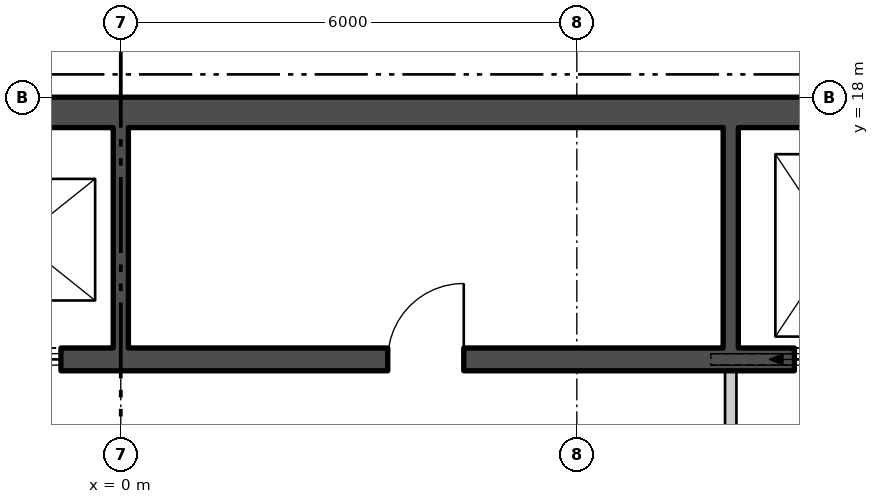
"""IFC4 building model, lengths in metres.
Left out: names, types, materials, properties, quantities, classifications, styles, units other than length and angle.
Written with IfcOpenShell. Run it as: python <this file> out.ifc"""

import sys

from ifc_helpers import new_model, si_unit, direction, frame, frame_2d, origin, place, context, subcontext, project, spatial, polyline, rectangle, outline, extrude, element, fill, save


model = new_model("IFC4")
c1 = context("Model", 3, precision=1e-05, world=origin(), true_north=direction((0.0, 1.0)))
c2 = subcontext(c1, "Body", "Model", "MODEL_VIEW")
j1 = project(units=[si_unit("LENGTHUNIT", "METRE"), si_unit("PLANEANGLEUNIT", "RADIAN")], contexts=[c1])
p1 = place(None, origin())
s1 = spatial("IfcSite", under=j1, at=p1, CompositionType="ELEMENT")
p2 = place(p1, origin())
s2 = spatial("IfcBuilding", under=s1, at=p2, CompositionType="ELEMENT")
p3 = place(p2, frame((0.0, 0.0, 312.6)))
s3 = spatial("IfcBuildingStorey", under=s2, at=p3, CompositionType="ELEMENT", Elevation=312.6)
p4 = place(p3, frame((2.12, -23.301, -0.18), z_axis=(0.0, 0.0, 1.0), x_axis=(0.500000141277, 0.866025322218, 0.0)))
e1 = element("IfcWall", 1, at=p4, inside=s3, PredefinedType="SOLIDWALL", context=c2, shape_type="SweptSolid", body=[
    extrude(outline(polyline([(-0.13, -0.225), (45.86, -0.225), (45.6, 0.225), (0.13, 0.225), (-0.13, -0.225)])), origin(), (0.0, 0.0, 1.0), 3.98),
])
p5 = place(p4, frame((1.424, 0.0, 1.08)))
e2 = element("IfcOpeningElement", 2, at=p5, cuts=e1, PredefinedType="OPENING", context=c2, shape_type="SweptSolid", body=[
    extrude(rectangle(XDim=2.4, YDim=2.3, at=frame_2d((1.2, 1.15))), frame((0.0, 0.235, 0.0), z_axis=(0.0, -1.0, 0.0), x_axis=(1.0, 0.0, 0.0)), (0.0, 0.0, 1.0), 0.47),
])
p6 = place(p4, frame((5.892, 0.0, 1.08)))
e3 = element("IfcOpeningElement", 3, at=p6, cuts=e1, PredefinedType="OPENING", context=c2, shape_type="SweptSolid", body=[
    extrude(rectangle(XDim=2.4, YDim=2.3, at=frame_2d((1.2, 1.15))), frame((0.0, 0.235, 0.0), z_axis=(0.0, -1.0, 0.0), x_axis=(1.0, 0.0, 0.0)), (0.0, 0.0, 1.0), 0.47),
])
p7 = place(p4, frame((14.905, 0.0, 1.08)))
e4 = element("IfcOpeningElement", 4, at=p7, cuts=e1, PredefinedType="OPENING", context=c2, shape_type="SweptSolid", body=[
    extrude(rectangle(XDim=2.4, YDim=2.3, at=frame_2d((1.2, 1.15))), frame((0.0, 0.235, 0.0), z_axis=(0.0, -1.0, 0.0), x_axis=(1.0, 0.0, 0.0)), (0.0, 0.0, 1.0), 0.47),
])
p8 = place(p4, frame((19.412, 0.0, 1.08)))
e5 = element("IfcOpeningElement", 5, at=p8, cuts=e1, PredefinedType="OPENING", context=c2, shape_type="SweptSolid", body=[
    extrude(rectangle(XDim=2.4, YDim=2.3, at=frame_2d((1.2, 1.15))), frame((0.0, 0.235, 0.0), z_axis=(0.0, -1.0, 0.0), x_axis=(1.0, 0.0, 0.0)), (0.0, 0.0, 1.0), 0.47),
])
p9 = place(p4, frame((23.918, 0.0, 1.08)))
e6 = element("IfcOpeningElement", 6, at=p9, cuts=e1, PredefinedType="OPENING", context=c2, shape_type="SweptSolid", body=[
    extrude(rectangle(XDim=2.4, YDim=2.3, at=frame_2d((1.2, 1.15))), frame((0.0, 0.235, 0.0), z_axis=(0.0, -1.0, 0.0), x_axis=(1.0, 0.0, 0.0)), (0.0, 0.0, 1.0), 0.47),
])
p10 = place(p4, frame((28.425, 0.0, 1.08)))
e7 = element("IfcOpeningElement", 7, at=p10, cuts=e1, PredefinedType="OPENING", context=c2, shape_type="SweptSolid", body=[
    extrude(rectangle(XDim=2.4, YDim=2.3, at=frame_2d((1.2, 1.15))), frame((0.0, 0.235, 0.0), z_axis=(0.0, -1.0, 0.0), x_axis=(1.0, 0.0, 0.0)), (0.0, 0.0, 1.0), 0.47),
])
p11 = place(p4, frame((37.438, 0.0, 1.08)))
e8 = element("IfcOpeningElement", 8, at=p11, cuts=e1, PredefinedType="OPENING", context=c2, shape_type="SweptSolid", body=[
    extrude(rectangle(XDim=2.4, YDim=2.3, at=frame_2d((1.2, 1.15))), frame((0.0, 0.235, 0.0), z_axis=(0.0, -1.0, 0.0), x_axis=(1.0, 0.0, 0.0)), (0.0, 0.0, 1.0), 0.47),
])
p12 = place(p4, frame((41.907, 0.0, 1.08)))
e9 = element("IfcOpeningElement", 9, at=p12, cuts=e1, PredefinedType="OPENING", context=c2, shape_type="SweptSolid", body=[
    extrude(rectangle(XDim=2.4, YDim=2.3, at=frame_2d((1.2, 1.15))), frame((0.0, 0.235, 0.0), z_axis=(0.0, -1.0, 0.0), x_axis=(1.0, 0.0, 0.0)), (0.0, 0.0, 1.0), 0.47),
])
p13 = place(p3, frame((-14.5, 17.8, 0.0), z_axis=(0.0, 0.0, 1.0), x_axis=(1.0, 0.0, 0.0)))
e10 = element("IfcWall", 10, at=p13, inside=s3, PredefinedType="SHEAR", context=c2, shape_type="SweptSolid", body=[
    extrude(rectangle(XDim=29.0, YDim=0.4, at=frame_2d((14.5, 0.0))), origin(), (0.0, 0.0, 1.0), 4.0),
])
p14 = place(p3, frame((-10.7, 14.55, 0.0), z_axis=(0.0, 0.0, 1.0), x_axis=(1.0, 0.0, 0.0)))
e11 = element("IfcWall", 11, at=p14, inside=s3, PredefinedType="SHEAR", context=c2, shape_type="SweptSolid", body=[
    extrude(rectangle(XDim=21.4, YDim=0.3, at=frame_2d((10.7, 0.0))), origin(), (0.0, 0.0, 1.0), 4.0),
])
p15 = place(p14, frame((0.738, 0.0, 0.0)))
e12 = element("IfcOpeningElement", 12, at=p15, cuts=e11, PredefinedType="OPENING", context=c2, shape_type="SweptSolid", body=[
    extrude(rectangle(XDim=1.1, YDim=2.1, at=frame_2d((0.55, 1.05))), frame((0.0, 0.16, 0.0), z_axis=(0.0, -1.0, 0.0), x_axis=(1.0, 0.0, 0.0)), (0.0, 0.0, 1.0), 0.32),
])
p16 = place(p14, frame((3.462, 0.0, 0.0)))
e13 = element("IfcOpeningElement", 13, at=p16, cuts=e11, PredefinedType="OPENING", context=c2, shape_type="SweptSolid", body=[
    extrude(rectangle(XDim=1.1, YDim=2.1, at=frame_2d((0.55, 1.05))), frame((0.0, 0.16, 0.0), z_axis=(0.0, -1.0, 0.0), x_axis=(1.0, 0.0, 0.0)), (0.0, 0.0, 1.0), 0.32),
])
p17 = place(p14, frame((6.138, 0.0, 0.0)))
e14 = element("IfcOpeningElement", 14, at=p17, cuts=e11, PredefinedType="OPENING", context=c2, shape_type="SweptSolid", body=[
    extrude(rectangle(XDim=1.1, YDim=2.1, at=frame_2d((0.55, 1.05))), frame((0.0, 0.16, 0.0), z_axis=(0.0, -1.0, 0.0), x_axis=(1.0, 0.0, 0.0)), (0.0, 0.0, 1.0), 0.32),
])
p18 = place(p14, frame((8.812, 0.0, 0.0)))
e15 = element("IfcOpeningElement", 15, at=p18, cuts=e11, PredefinedType="OPENING", context=c2, shape_type="SweptSolid", body=[
    extrude(rectangle(XDim=1.1, YDim=2.1, at=frame_2d((0.55, 1.05))), frame((0.0, 0.16, 0.0), z_axis=(0.0, -1.0, 0.0), x_axis=(1.0, 0.0, 0.0)), (0.0, 0.0, 1.0), 0.32),
])
p19 = place(p14, frame((19.562, 0.0, 0.0)))
e16 = element("IfcOpeningElement", 16, at=p19, cuts=e11, PredefinedType="OPENING", context=c2, shape_type="SweptSolid", body=[
    extrude(rectangle(XDim=1.1, YDim=2.1, at=frame_2d((0.55, 1.05))), frame((0.0, 0.16, 0.0), z_axis=(0.0, -1.0, 0.0), x_axis=(1.0, 0.0, 0.0)), (0.0, 0.0, 1.0), 0.32),
])
p20 = place(p14, frame((14.213, 0.0, 0.0)))
e17 = element("IfcOpeningElement", 17, at=p20, cuts=e11, PredefinedType="OPENING", context=c2, shape_type="SweptSolid", body=[
    extrude(rectangle(XDim=1.0, YDim=2.1, at=frame_2d((0.5, 1.05))), frame((0.0, 0.16, 0.0), z_axis=(0.0, -1.0, 0.0), x_axis=(1.0, 0.0, 0.0)), (0.0, 0.0, 1.0), 0.32),
])
for number, where, z_axis, x_axis in (
    (18, (0.0, 14.7, 0.0), (0.0, 0.0, 1.0), (0.0, 1.0, 0.0)),
    (19, (8.025, 14.7, 0.0), (0.0, 0.0, 1.0), (0.0, 1.0, 0.0)),
):
    element("IfcWall", number, at=place(p3, frame(where, z_axis=z_axis, x_axis=x_axis)), inside=s3, PredefinedType="SHEAR", context=c2, shape_type="SweptSolid", body=[
        extrude(rectangle(XDim=2.9, YDim=0.2, at=frame_2d((1.45, 0.0))), origin(), (0.0, 0.0, 1.0), 4.0),
    ])
p21 = place(p3, frame((8.025, 10.8, 0.0), z_axis=(0.0, 0.0, 1.0), x_axis=(0.0, 1.0, 0.0)))
e20 = element("IfcWall", 20, at=p21, inside=s3, PredefinedType="PARTITIONING", context=c2, shape_type="SweptSolid", body=[
    extrude(rectangle(XDim=3.6, YDim=0.15, at=frame_2d((1.8, 0.0))), origin(), (0.0, 0.0, 1.0), 4.0),
])
p22 = place(p21, frame((1.175, 0.0, 0.0)))
e21 = element("IfcOpeningElement", 21, at=p22, cuts=e20, PredefinedType="OPENING", context=c2, shape_type="SweptSolid", body=[
    extrude(rectangle(XDim=1.25, YDim=2.1, at=frame_2d((0.625, 1.05))), frame((0.0, 0.085, 0.0), z_axis=(0.0, -1.0, 0.0), x_axis=(1.0, 0.0, 0.0)), (0.0, 0.0, 1.0), 0.17),
])
p23 = place(p18, origin())
e22 = element("IfcDoor", 22, at=p23, inside=s3, OperationType="SLIDING_TO_LEFT", PredefinedType="DOOR", context=c2, shape_type="SweptSolid", body=[
    extrude(rectangle(XDim=1.1, YDim=2.1, at=frame_2d((0.55, 1.05))), frame((0.0, 0.025, 0.0), z_axis=(0.0, -1.0, 0.0), x_axis=(1.0, 0.0, 0.0)), (0.0, 0.0, 1.0), 0.05),
])
fill(e15, e22)
p24 = place(p19, origin())
e23 = element("IfcDoor", 23, at=p24, inside=s3, OperationType="SLIDING_TO_LEFT", PredefinedType="DOOR", context=c2, shape_type="SweptSolid", body=[
    extrude(rectangle(XDim=1.1, YDim=2.1, at=frame_2d((0.55, 1.05))), frame((0.0, 0.025, 0.0), z_axis=(0.0, -1.0, 0.0), x_axis=(1.0, 0.0, 0.0)), (0.0, 0.0, 1.0), 0.05),
])
fill(e16, e23)
p25 = place(p20, origin())
e24 = element("IfcDoor", 24, at=p25, inside=s3, OperationType="SINGLE_SWING_LEFT", PredefinedType="DOOR", context=c2, shape_type="SweptSolid", body=[
    extrude(rectangle(XDim=1.0, YDim=2.1, at=frame_2d((0.5, 1.05))), frame((0.0, 0.025, 0.0), z_axis=(0.0, -1.0, 0.0), x_axis=(1.0, 0.0, 0.0)), (0.0, 0.0, 1.0), 0.05),
])
fill(e17, e24)
save(model, sys.argv[1])
